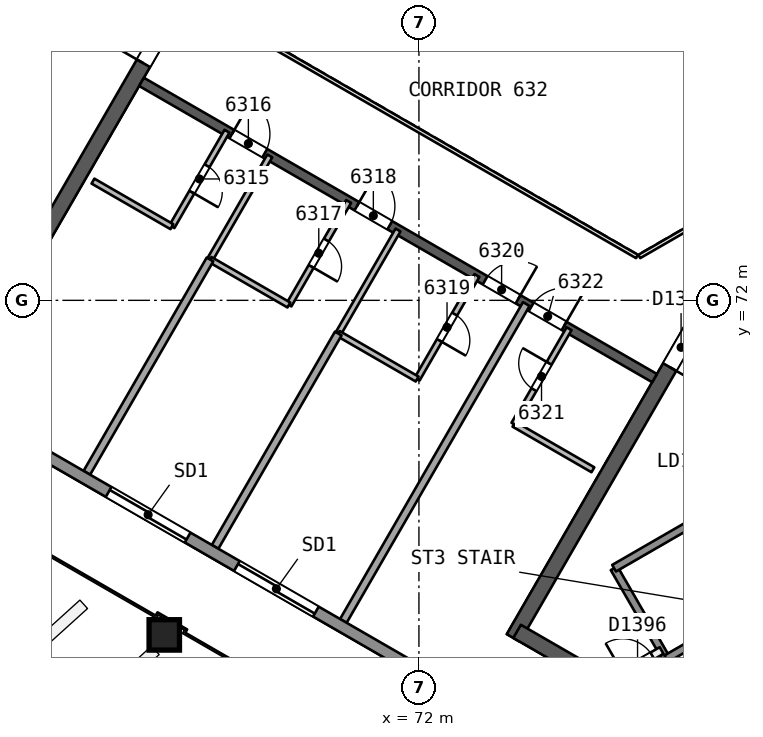
"""IFC4 building model, lengths in metres.
Left out: names, types, materials, properties, quantities, classifications, styles, units other than length and angle.
Written with IfcOpenShell. Run it as: python <this file> out.ifc"""

import sys

from ifc_helpers import new_model, si_unit, direction, frame, frame_2d, origin, origin_2d, place, context, subcontext, project, spatial, rectangle, extrude, element, fill, save


model = new_model("IFC4")
c1 = context("Model", 3, precision=1e-05, world=origin(), true_north=direction((0.0, 1.0)))
c2 = subcontext(c1, "Body", "Model", "MODEL_VIEW")
j1 = project(units=[si_unit("LENGTHUNIT", "METRE"), si_unit("PLANEANGLEUNIT", "RADIAN")], contexts=[c1])
p1 = place(None, origin())
s1 = spatial("IfcSite", under=j1, at=p1, CompositionType="ELEMENT")
p2 = place(p1, origin())
s2 = spatial("IfcBuilding", under=s1, at=p2, CompositionType="ELEMENT")
p3 = place(p2, frame((0.0, 0.0, 259.0)))
s3 = spatial("IfcBuildingStorey", under=s2, at=p3, CompositionType="ELEMENT", Elevation=259.0)
p4 = place(p3, frame((60.737, 71.284, 0.0), z_axis=(0.0, 0.0, 1.0), x_axis=(0.50000547566, 0.866022242388, 0.0)))
e1 = element("IfcWall", 1, at=p4, inside=s3, PredefinedType="SHEAR", context=c2, shape_type="SweptSolid", body=[
    extrude(rectangle(XDim=10.18, YDim=0.4, at=frame_2d((5.09, 0.0))), origin(), (0.0, 0.0, 1.0), 3.7),
])
p5 = place(p4, frame((8.03, 0.0, 0.0)))
e2 = element("IfcOpeningElement", 2, at=p5, cuts=e1, PredefinedType="OPENING", context=c2, shape_type="SweptSolid", body=[
    extrude(rectangle(XDim=1.2, YDim=2.1, at=frame_2d((0.6, 1.05))), frame((0.0, 0.21, 0.0), z_axis=(0.0, -1.0, 0.0), x_axis=(1.0, 0.0, 0.0)), (0.0, 0.0, 1.0), 0.421),
])
p6 = place(p3, frame((79.615, 72.006, 0.0), z_axis=(0.0, 0.0, 1.0), x_axis=(-0.50000177223, -0.866024380585, 0.0)))
e3 = element("IfcWall", 3, at=p6, inside=s3, PredefinedType="SHEAR", context=c2, shape_type="SweptSolid", body=[
    extrude(rectangle(XDim=10.265, YDim=0.4, at=frame_2d((5.132, 0.0))), origin(), (0.0, 0.0, 1.0), 3.7),
])
p7 = place(p6, frame((0.834, 0.0, 0.0)))
e4 = element("IfcOpeningElement", 4, at=p7, cuts=e3, PredefinedType="OPENING", context=c2, shape_type="SweptSolid", body=[
    extrude(rectangle(XDim=1.2, YDim=2.1, at=frame_2d((0.6, 1.05))), frame((0.0, 0.21, 0.0), z_axis=(0.0, -1.0, 0.0), x_axis=(1.0, 0.0, 0.0)), (0.0, 0.0, 1.0), 0.421),
])
p8 = place(p3, frame((74.583, 63.29, 0.0), z_axis=(0.0, 0.0, 1.0), x_axis=(0.866024494188, -0.500001575463, 0.0)))
e5 = element("IfcWall", 5, at=p8, inside=s3, PredefinedType="SHEAR", context=c2, shape_type="SweptSolid", body=[
    extrude(rectangle(XDim=14.133, YDim=0.4, at=frame_2d((7.067, 0.0))), origin(), (0.0, 0.0, 1.0), 3.7),
])
p9 = place(p3, frame((64.7, 77.748, 0.0), z_axis=(0.0, 0.0, 1.0), x_axis=(0.866026492143, -0.499998114903, 0.0)))
e6 = element("IfcWall", 6, at=p9, inside=s3, PredefinedType="SHEAR", context=c2, shape_type="SweptSolid", body=[
    extrude(rectangle(XDim=15.588, YDim=0.25, at=frame_2d((7.794, 0.0))), origin(), (0.0, 0.0, 1.0), 3.3),
])
p10 = place(p9, frame((2.747, 0.0, 0.0)))
e7 = element("IfcOpeningElement", 7, at=p10, cuts=e6, PredefinedType="OPENING", context=c2, shape_type="SweptSolid", body=[
    extrude(rectangle(XDim=1.0, YDim=2.1, at=frame_2d((0.5, 1.05))), frame((0.0, 0.135, 0.0), z_axis=(0.0, -1.0, 0.0), x_axis=(1.0, 0.0, 0.0)), (0.0, 0.0, 1.0), 0.271),
])
p11 = place(p9, frame((6.544, 0.0, 0.0)))
e8 = element("IfcOpeningElement", 8, at=p11, cuts=e6, PredefinedType="OPENING", context=c2, shape_type="SweptSolid", body=[
    extrude(rectangle(XDim=1.0, YDim=2.1, at=frame_2d((0.5, 1.05))), frame((0.0, 0.135, 0.0), z_axis=(0.0, -1.0, 0.0), x_axis=(1.0, 0.0, 0.0)), (0.0, 0.0, 1.0), 0.271),
])
p12 = place(p9, frame((10.441, 0.0, 0.0)))
e9 = element("IfcOpeningElement", 9, at=p12, cuts=e6, PredefinedType="OPENING", context=c2, shape_type="SweptSolid", body=[
    extrude(rectangle(XDim=1.0, YDim=2.1, at=frame_2d((0.5, 1.05))), frame((0.0, 0.135, 0.0), z_axis=(0.0, -1.0, 0.0), x_axis=(1.0, 0.0, 0.0)), (0.0, 0.0, 1.0), 0.271),
])
p13 = place(p9, frame((11.841, 0.0, 0.0)))
e10 = element("IfcOpeningElement", 10, at=p13, cuts=e6, PredefinedType="OPENING", context=c2, shape_type="SweptSolid", body=[
    extrude(rectangle(XDim=1.0, YDim=2.1, at=frame_2d((0.5, 1.05))), frame((0.0, 0.135, 0.0), z_axis=(0.0, -1.0, 0.0), x_axis=(1.0, 0.0, 0.0)), (0.0, 0.0, 1.0), 0.271),
])
p14 = place(p3, frame((65.287, 63.176, 0.0), z_axis=(0.010093620709, 0.017482414954, 0.999796221231), x_axis=(-0.499907122366, -0.865843723195, 0.020187025824)))
e11 = element("IfcColumn", 11, at=p14, inside=s3, PredefinedType="COLUMN", context=c2, shape_type="SweptSolid", body=[
    extrude(rectangle(XDim=0.8, YDim=0.8, at=origin_2d()), origin(), (0.0, 0.0, 1.0), 3.701),
])
p15 = place(p3, frame((66.949, 76.45, 0.0), z_axis=(0.0, 0.0, 1.0), x_axis=(-0.499987231761, -0.866032775405, 0.0)))
e12 = element("IfcWall", 12, at=p15, inside=s3, PredefinedType="PARTITIONING", context=c2, shape_type="SweptSolid", body=[
    extrude(rectangle(XDim=2.9, YDim=0.15, at=frame_2d((1.45, 0.0))), origin(), (0.0, 0.0, 1.0), 3.3),
])
p16 = place(p15, frame((1.05, 0.0, 0.0)))
e13 = element("IfcOpeningElement", 13, at=p16, cuts=e12, PredefinedType="OPENING", context=c2, shape_type="SweptSolid", body=[
    extrude(rectangle(XDim=0.8, YDim=2.1, at=frame_2d((0.4, 1.05))), frame((0.0, 0.085, 0.0), z_axis=(0.0, -1.0, 0.0), x_axis=(1.0, 0.0, 0.0)), (0.0, 0.0, 1.0), 0.171),
])
p17 = place(p3, frame((65.499, 73.938, 0.0), z_axis=(0.0, 0.0, 1.0), x_axis=(-0.866004188936, 0.500036743394, 0.0)))
e14 = element("IfcWall", 14, at=p17, inside=s3, PredefinedType="PARTITIONING", context=c2, shape_type="SweptSolid", body=[
    extrude(rectangle(XDim=2.398, YDim=0.15, at=frame_2d((1.199, 0.0))), origin(), (0.0, 0.0, 1.0), 3.3),
])
p18 = place(p3, frame((63.261, 67.462, 0.0), z_axis=(0.0, 0.0, 1.0), x_axis=(0.499983274767, 0.866035059887, 0.0)))
e15 = element("IfcWall", 15, at=p18, inside=s3, PredefinedType="PARTITIONING", context=c2, shape_type="SweptSolid", body=[
    extrude(rectangle(XDim=6.482, YDim=0.2, at=frame_2d((3.241, 0.0))), origin(), (0.0, 0.0, 1.0), 3.3),
])
p19 = place(p3, frame((66.502, 73.076, 0.0), z_axis=(0.0, 0.0, 1.0), x_axis=(0.499995674689, 0.86602790099, 0.0)))
e16 = element("IfcWall", 16, at=p19, inside=s3, PredefinedType="PARTITIONING", context=c2, shape_type="SweptSolid", body=[
    extrude(rectangle(XDim=3.146, YDim=0.15, at=frame_2d((1.573, 0.0))), origin(), (0.0, 0.0, 1.0), 3.3),
])
p20 = place(p3, frame((70.151, 74.601, 0.0), z_axis=(0.0, 0.0, 1.0), x_axis=(-0.499995674689, -0.86602790099, 0.0)))
e17 = element("IfcWall", 17, at=p20, inside=s3, PredefinedType="PARTITIONING", context=c2, shape_type="SweptSolid", body=[
    extrude(rectangle(XDim=3.146, YDim=0.15, at=frame_2d((1.573, 0.0))), origin(), (0.0, 0.0, 1.0), 3.3),
])
p21 = place(p20, frame((1.173, 0.0, 0.0)))
e18 = element("IfcOpeningElement", 18, at=p21, cuts=e17, PredefinedType="OPENING", context=c2, shape_type="SweptSolid", body=[
    extrude(rectangle(XDim=0.8, YDim=2.1, at=frame_2d((0.4, 1.05))), frame((0.0, 0.085, 0.0), z_axis=(0.0, -1.0, 0.0), x_axis=(1.0, 0.0, 0.0)), (0.0, 0.0, 1.0), 0.171),
])
p22 = place(p3, frame((68.578, 71.877, 0.0), z_axis=(0.0, 0.0, 1.0), x_axis=(-0.866034636017, 0.499984008963, 0.0)))
e19 = element("IfcWall", 19, at=p22, inside=s3, PredefinedType="PARTITIONING", context=c2, shape_type="SweptSolid", body=[
    extrude(rectangle(XDim=2.397, YDim=0.15, at=frame_2d((1.198, 0.0))), origin(), (0.0, 0.0, 1.0), 3.3),
])
p23 = place(p3, frame((66.636, 65.513, 0.0), z_axis=(0.0, 0.0, 1.0), x_axis=(0.499983274767, 0.866035059887, 0.0)))
e20 = element("IfcWall", 20, at=p23, inside=s3, PredefinedType="PARTITIONING", context=c2, shape_type="SweptSolid", body=[
    extrude(rectangle(XDim=6.482, YDim=0.2, at=frame_2d((3.241, 0.0))), origin(), (0.0, 0.0, 1.0), 3.3),
])
p24 = place(p3, frame((69.877, 71.127, 0.0), z_axis=(0.0, 0.0, 1.0), x_axis=(0.499995674689, 0.86602790099, 0.0)))
e21 = element("IfcWall", 21, at=p24, inside=s3, PredefinedType="PARTITIONING", context=c2, shape_type="SweptSolid", body=[
    extrude(rectangle(XDim=3.146, YDim=0.15, at=frame_2d((1.573, 0.0))), origin(), (0.0, 0.0, 1.0), 3.3),
])
p25 = place(p3, frame((73.526, 72.653, 0.0), z_axis=(0.0, 0.0, 1.0), x_axis=(-0.500029284648, -0.866008495625, 0.0)))
e22 = element("IfcWall", 22, at=p25, inside=s3, PredefinedType="PARTITIONING", context=c2, shape_type="SweptSolid", body=[
    extrude(rectangle(XDim=3.145, YDim=0.15, at=frame_2d((1.573, 0.0))), origin(), (0.0, 0.0, 1.0), 3.3),
])
p26 = place(p25, frame((1.173, 0.0, 0.0)))
e23 = element("IfcOpeningElement", 23, at=p26, cuts=e22, PredefinedType="OPENING", context=c2, shape_type="SweptSolid", body=[
    extrude(rectangle(XDim=0.8, YDim=2.1, at=frame_2d((0.4, 1.05))), frame((0.0, 0.085, 0.0), z_axis=(0.0, -1.0, 0.0), x_axis=(1.0, 0.0, 0.0)), (0.0, 0.0, 1.0), 0.171),
])
p27 = place(p3, frame((71.953, 69.929, 0.0), z_axis=(0.0, 0.0, 1.0), x_axis=(-0.866034636017, 0.499984008963, 0.0)))
e24 = element("IfcWall", 24, at=p27, inside=s3, PredefinedType="PARTITIONING", context=c2, shape_type="SweptSolid", body=[
    extrude(rectangle(XDim=2.397, YDim=0.15, at=frame_2d((1.198, 0.0))), origin(), (0.0, 0.0, 1.0), 3.3),
])
p28 = place(p3, frame((70.011, 63.565, 0.0), z_axis=(0.0, 0.0, 1.0), x_axis=(0.499987326052, 0.866032720968, 0.0)))
e25 = element("IfcWall", 25, at=p28, inside=s3, PredefinedType="PARTITIONING", context=c2, shape_type="SweptSolid", body=[
    extrude(rectangle(XDim=9.628, YDim=0.2, at=frame_2d((4.814, 0.0))), origin(), (0.0, 0.0, 1.0), 3.3),
])
p29 = place(p3, frame((76.578, 67.542, 0.0), z_axis=(0.0, 0.0, 1.0), x_axis=(-0.866048270239, 0.499960392047, 0.0)))
e26 = element("IfcWall", 26, at=p29, inside=s3, PredefinedType="PARTITIONING", context=c2, shape_type="SweptSolid", body=[
    extrude(rectangle(XDim=2.398, YDim=0.15, at=frame_2d((1.199, 0.0))), origin(), (0.0, 0.0, 1.0), 3.3),
])
p30 = place(p3, frame((74.501, 68.741, 0.0), z_axis=(0.0, 0.0, 1.0), x_axis=(0.50005036918, 0.865996321171, 0.0)))
e27 = element("IfcWall", 27, at=p30, inside=s3, PredefinedType="PARTITIONING", context=c2, shape_type="SweptSolid", body=[
    extrude(rectangle(XDim=2.9, YDim=0.15, at=frame_2d((1.45, 0.0))), origin(), (0.0, 0.0, 1.0), 3.3),
])
p31 = place(p30, frame((1.05, 0.0, 0.0)))
e28 = element("IfcOpeningElement", 28, at=p31, cuts=e27, PredefinedType="OPENING", context=c2, shape_type="SweptSolid", body=[
    extrude(rectangle(XDim=0.8, YDim=2.1, at=frame_2d((0.4, 1.05))), frame((0.0, 0.085, 0.0), z_axis=(0.0, -1.0, 0.0), x_axis=(1.0, 0.0, 0.0)), (0.0, 0.0, 1.0), 0.171),
])
p32 = place(p3, frame((87.577, 53.251, 0.0), z_axis=(0.0, 0.0, 1.0), x_axis=(-0.86602550179, 0.499999830249, 0.0)))
e29 = element("IfcWall", 29, at=p32, inside=s3, PredefinedType="SOLIDWALL", context=c2, shape_type="SweptSolid", body=[
    extrude(rectangle(XDim=48.533, YDim=0.3, at=frame_2d((24.267, 0.0))), origin(), (0.0, 0.0, 1.0), 3.3),
])
p33 = place(p32, frame((37.192, 0.0, 0.0)))
e30 = element("IfcOpeningElement", 30, at=p33, cuts=e29, PredefinedType="OPENING", context=c2, shape_type="SweptSolid", body=[
    extrude(rectangle(XDim=2.4, YDim=2.4, at=frame_2d((1.2, 1.2))), frame((0.0, 0.161, 0.0), z_axis=(0.0, -1.0, 0.0), x_axis=(1.0, 0.0, 0.0)), (0.0, 0.0, 1.0), 0.321),
])
p34 = place(p32, frame((8.941, 0.0, 0.0)))
e31 = element("IfcOpeningElement", 31, at=p34, cuts=e29, PredefinedType="OPENING", context=c2, shape_type="SweptSolid", body=[
    extrude(rectangle(XDim=2.4, YDim=2.4, at=frame_2d((1.2, 1.2))), frame((0.0, 0.161, 0.0), z_axis=(0.0, -1.0, 0.0), x_axis=(1.0, 0.0, 0.0)), (0.0, 0.0, 1.0), 0.321),
])
p35 = place(p32, frame((25.015, 0.0, 0.0)))
e32 = element("IfcOpeningElement", 32, at=p35, cuts=e29, PredefinedType="OPENING", context=c2, shape_type="SweptSolid", body=[
    extrude(rectangle(XDim=2.4, YDim=2.4, at=frame_2d((1.2, 1.2))), frame((0.0, 0.161, 0.0), z_axis=(0.0, -1.0, 0.0), x_axis=(1.0, 0.0, 0.0)), (0.0, 0.0, 1.0), 0.321),
])
p36 = place(p32, frame((21.118, 0.0, 0.0)))
e33 = element("IfcOpeningElement", 33, at=p36, cuts=e29, PredefinedType="OPENING", context=c2, shape_type="SweptSolid", body=[
    extrude(rectangle(XDim=2.4, YDim=2.4, at=frame_2d((1.2, 1.2))), frame((0.0, 0.161, 0.0), z_axis=(0.0, -1.0, 0.0), x_axis=(1.0, 0.0, 0.0)), (0.0, 0.0, 1.0), 0.321),
])
p37 = place(p3, frame((77.135, 64.952, 0.0), z_axis=(0.0, 0.0, 1.0), x_axis=(0.499996545922, -0.866027397988, 0.0)))
e34 = element("IfcWall", 34, at=p37, inside=s3, PredefinedType="SOLIDWALL", context=c2, shape_type="SweptSolid", body=[
    extrude(rectangle(XDim=2.75, YDim=0.2, at=frame_2d((1.375, 0.0))), origin(), (0.0, 0.0, 1.0), 3.3),
])
p38 = place(p3, frame((77.135, 64.952, 0.0), z_axis=(0.0, 0.0, 1.0), x_axis=(0.866031916153, 0.499988720078, 0.0)))
e35 = element("IfcWall", 35, at=p38, inside=s3, PredefinedType="SOLIDWALL", context=c2, shape_type="SweptSolid", body=[
    extrude(rectangle(XDim=11.35, YDim=0.2, at=frame_2d((5.675, 0.0))), origin(), (0.0, 0.0, 1.0), 3.3),
])
p39 = place(p38, frame((2.875, 0.0, 0.0)))
e36 = element("IfcOpeningElement", 36, at=p39, cuts=e35, PredefinedType="OPENING", context=c2, shape_type="SweptSolid", body=[
    extrude(rectangle(XDim=1.1, YDim=2.1, at=frame_2d((0.55, 1.05))), frame((0.0, 0.11, 0.0), z_axis=(0.0, -1.0, 0.0), x_axis=(1.0, 0.0, 0.0)), (0.0, 0.0, 1.0), 0.221),
])
p40 = place(p38, frame((5.125, 0.0, 0.0)))
e37 = element("IfcOpeningElement", 37, at=p40, cuts=e35, PredefinedType="OPENING", context=c2, shape_type="SweptSolid", body=[
    extrude(rectangle(XDim=1.1, YDim=2.1, at=frame_2d((0.55, 1.05))), frame((0.0, 0.11, 0.0), z_axis=(0.0, -1.0, 0.0), x_axis=(1.0, 0.0, 0.0)), (0.0, 0.0, 1.0), 0.221),
])
p41 = place(p38, frame((7.375, 0.0, 0.0)))
e38 = element("IfcOpeningElement", 38, at=p41, cuts=e35, PredefinedType="OPENING", context=c2, shape_type="SweptSolid", body=[
    extrude(rectangle(XDim=1.1, YDim=2.1, at=frame_2d((0.55, 1.05))), frame((0.0, 0.11, 0.0), z_axis=(0.0, -1.0, 0.0), x_axis=(1.0, 0.0, 0.0)), (0.0, 0.0, 1.0), 0.221),
])
p42 = place(p3, frame((77.12, 62.056, 0.0), z_axis=(0.0, 0.0, 1.0), x_axis=(0.866054810376, 0.49994906283, 0.0)))
e39 = element("IfcWall", 39, at=p42, inside=s3, PredefinedType="PARTITIONING", context=c2, shape_type="SweptSolid", body=[
    extrude(rectangle(XDim=1.461, YDim=0.2, at=frame_2d((0.73, 0.0))), origin(), (0.0, 0.0, 1.0), 3.3),
])
p43 = place(p42, frame((0.281, 0.0, 0.0)))
e40 = element("IfcOpeningElement", 40, at=p43, cuts=e39, PredefinedType="OPENING", context=c2, shape_type="SweptSolid", body=[
    extrude(rectangle(XDim=0.9, YDim=2.1, at=frame_2d((0.45, 1.05))), frame((0.0, 0.11, 0.0), z_axis=(0.0, -1.0, 0.0), x_axis=(1.0, 0.0, 0.0)), (0.0, 0.0, 1.0), 0.221),
])
p44 = place(p3, frame((78.51, 62.57, 0.0), z_axis=(0.0, 0.0, 1.0), x_axis=(0.866053019151, 0.499952165731, 0.0)))
e41 = element("IfcWall", 41, at=p44, inside=s3, PredefinedType="SOLIDWALL", context=c2, shape_type="SweptSolid", body=[
    extrude(rectangle(XDim=2.3, YDim=0.2, at=frame_2d((1.15, 0.0))), origin(), (0.0, 0.0, 1.0), 3.3),
])
p45 = place(p3, frame((67.702, 78.948, 0.0), z_axis=(0.0, 0.0, 1.0), x_axis=(0.866026658274, -0.499997827154, 0.0)))
e42 = element("IfcWall", 42, at=p45, inside=s3, PredefinedType="PARTITIONING", context=c2, shape_type="SweptSolid", body=[
    extrude(rectangle(XDim=11.588, YDim=0.1, at=frame_2d((5.794, 0.0))), origin(), (0.0, 0.0, 1.0), 3.3),
])
p46 = place(p3, frame((77.798, 73.154, 0.0), z_axis=(0.0, 0.0, 1.0), x_axis=(0.866041268327, 0.499972520799, 0.0)))
e43 = element("IfcWall", 43, at=p46, inside=s3, PredefinedType="PARTITIONING", context=c2, shape_type="SweptSolid", body=[
    extrude(rectangle(XDim=2.0, YDim=0.1, at=frame_2d((1.0, 0.0))), origin(), (0.0, 0.0, 1.0), 3.3),
])
p47 = place(p16, origin())
e44 = element("IfcDoor", 44, at=p47, inside=s3, OperationType="SINGLE_SWING_RIGHT", PredefinedType="NOTDEFINED", context=c2, shape_type="SweptSolid", body=[
    extrude(rectangle(XDim=0.8, YDim=2.1, at=frame_2d((0.4, 1.05))), frame((0.0, 0.025, 0.0), z_axis=(0.0, -1.0, 0.0), x_axis=(1.0, 0.0, 0.0)), (0.0, 0.0, 1.0), 0.05),
])
fill(e13, e44)
p48 = place(p10, origin())
e45 = element("IfcDoor", 45, at=p48, inside=s3, OperationType="SINGLE_SWING_LEFT", PredefinedType="NOTDEFINED", context=c2, shape_type="SweptSolid", body=[
    extrude(rectangle(XDim=1.0, YDim=2.1, at=frame_2d((0.5, 1.05))), frame((0.0, 0.025, 0.0), z_axis=(0.0, -1.0, 0.0), x_axis=(1.0, 0.0, 0.0)), (0.0, 0.0, 1.0), 0.05),
])
fill(e7, e45)
p49 = place(p21, origin())
e46 = element("IfcDoor", 46, at=p49, inside=s3, OperationType="SINGLE_SWING_RIGHT", PredefinedType="NOTDEFINED", context=c2, shape_type="SweptSolid", body=[
    extrude(rectangle(XDim=0.8, YDim=2.1, at=frame_2d((0.4, 1.05))), frame((0.0, 0.025, 0.0), z_axis=(0.0, -1.0, 0.0), x_axis=(1.0, 0.0, 0.0)), (0.0, 0.0, 1.0), 0.05),
])
fill(e18, e46)
p50 = place(p11, origin())
e47 = element("IfcDoor", 47, at=p50, inside=s3, OperationType="SINGLE_SWING_LEFT", PredefinedType="NOTDEFINED", context=c2, shape_type="SweptSolid", body=[
    extrude(rectangle(XDim=1.0, YDim=2.1, at=frame_2d((0.5, 1.05))), frame((0.0, 0.025, 0.0), z_axis=(0.0, -1.0, 0.0), x_axis=(1.0, 0.0, 0.0)), (0.0, 0.0, 1.0), 0.05),
])
fill(e8, e47)
p51 = place(p26, origin())
e48 = element("IfcDoor", 48, at=p51, inside=s3, OperationType="SINGLE_SWING_RIGHT", PredefinedType="NOTDEFINED", context=c2, shape_type="SweptSolid", body=[
    extrude(rectangle(XDim=0.8, YDim=2.1, at=frame_2d((0.4, 1.05))), frame((0.0, 0.025, 0.0), z_axis=(0.0, -1.0, 0.0), x_axis=(1.0, 0.0, 0.0)), (0.0, 0.0, 1.0), 0.05),
])
fill(e23, e48)
p52 = place(p12, origin())
e49 = element("IfcDoor", 49, at=p52, inside=s3, OperationType="SINGLE_SWING_RIGHT", PredefinedType="NOTDEFINED", context=c2, shape_type="SweptSolid", body=[
    extrude(rectangle(XDim=1.0, YDim=2.1, at=frame_2d((0.5, 1.05))), frame((0.0, 0.025, 0.0), z_axis=(0.0, -1.0, 0.0), x_axis=(1.0, 0.0, 0.0)), (0.0, 0.0, 1.0), 0.05),
])
fill(e9, e49)
p53 = place(p31, origin())
e50 = element("IfcDoor", 50, at=p53, inside=s3, OperationType="SINGLE_SWING_RIGHT", PredefinedType="NOTDEFINED", context=c2, shape_type="SweptSolid", body=[
    extrude(rectangle(XDim=0.8, YDim=2.1, at=frame_2d((0.4, 1.05))), frame((0.0, 0.025, 0.0), z_axis=(0.0, -1.0, 0.0), x_axis=(1.0, 0.0, 0.0)), (0.0, 0.0, 1.0), 0.05),
])
fill(e28, e50)
p54 = place(p13, origin())
e51 = element("IfcDoor", 51, at=p54, inside=s3, OperationType="SINGLE_SWING_RIGHT", PredefinedType="NOTDEFINED", context=c2, shape_type="SweptSolid", body=[
    extrude(rectangle(XDim=1.0, YDim=2.1, at=frame_2d((0.5, 1.05))), frame((0.0, 0.025, 0.0), z_axis=(0.0, -1.0, 0.0), x_axis=(1.0, 0.0, 0.0)), (0.0, 0.0, 1.0), 0.05),
])
fill(e10, e51)
p55 = place(p35, origin())
e52 = element("IfcDoor", 52, at=p55, inside=s3, OperationType="SLIDING_TO_LEFT", PredefinedType="NOTDEFINED", context=c2, shape_type="SweptSolid", body=[
    extrude(rectangle(XDim=2.4, YDim=2.4, at=frame_2d((1.2, 1.2))), frame((0.0, 0.025, 0.0), z_axis=(0.0, -1.0, 0.0), x_axis=(1.0, 0.0, 0.0)), (0.0, 0.0, 1.0), 0.05),
])
fill(e32, e52)
p56 = place(p36, origin())
e53 = element("IfcDoor", 53, at=p56, inside=s3, OperationType="SLIDING_TO_RIGHT", PredefinedType="NOTDEFINED", context=c2, shape_type="SweptSolid", body=[
    extrude(rectangle(XDim=2.4, YDim=2.4, at=frame_2d((1.2, 1.2))), frame((0.0, 0.025, 0.0), z_axis=(0.0, -1.0, 0.0), x_axis=(1.0, 0.0, 0.0)), (0.0, 0.0, 1.0), 0.05),
])
fill(e33, e53)
p57 = place(p5, origin())
e54 = element("IfcDoor", 54, at=p57, inside=s3, OperationType="SINGLE_SWING_LEFT", PredefinedType="NOTDEFINED", context=c2, shape_type="SweptSolid", body=[
    extrude(rectangle(XDim=1.2, YDim=2.1, at=frame_2d((0.6, 1.05))), frame((0.0, 0.025, 0.0), z_axis=(0.0, -1.0, 0.0), x_axis=(1.0, 0.0, 0.0)), (0.0, 0.0, 1.0), 0.05),
])
fill(e2, e54)
p58 = place(p7, origin())
e55 = element("IfcDoor", 55, at=p58, inside=s3, OperationType="SINGLE_SWING_RIGHT", PredefinedType="NOTDEFINED", context=c2, shape_type="SweptSolid", body=[
    extrude(rectangle(XDim=1.2, YDim=2.1, at=frame_2d((0.6, 1.05))), frame((0.0, 0.025, 0.0), z_axis=(0.0, -1.0, 0.0), x_axis=(1.0, 0.0, 0.0)), (0.0, 0.0, 1.0), 0.05),
])
fill(e4, e55)
p59 = place(p43, origin())
e56 = element("IfcDoor", 56, at=p59, inside=s3, OperationType="SINGLE_SWING_LEFT", PredefinedType="NOTDEFINED", context=c2, shape_type="SweptSolid", body=[
    extrude(rectangle(XDim=0.9, YDim=2.1, at=frame_2d((0.45, 1.05))), frame((0.0, 0.025, 0.0), z_axis=(0.0, -1.0, 0.0), x_axis=(1.0, 0.0, 0.0)), (0.0, 0.0, 1.0), 0.05),
])
fill(e40, e56)
save(model, sys.argv[1])
